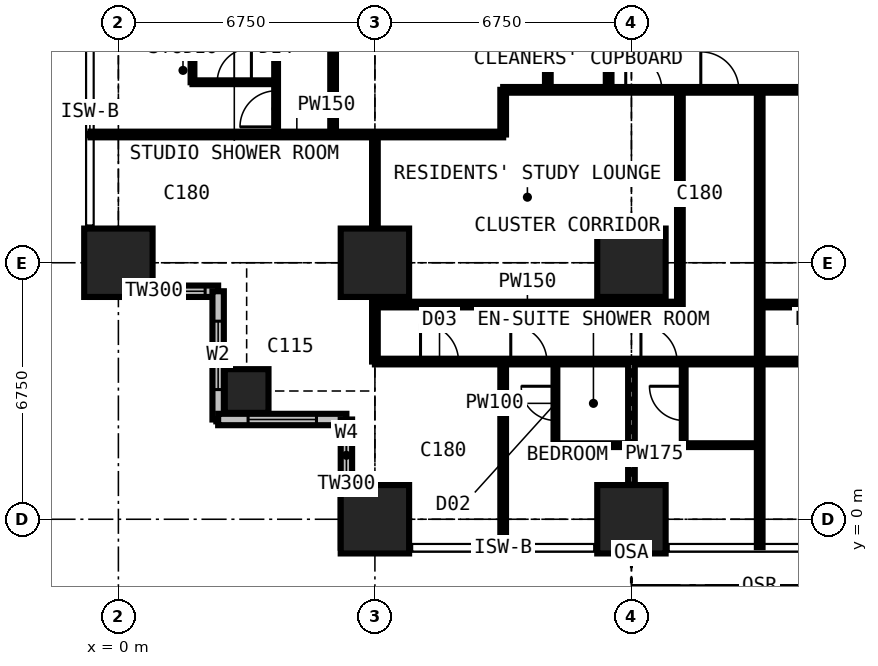
"""IFC4 building model, lengths in metres.
Left out: names, types, materials, properties, quantities, classifications, styles, units other than length and angle.
Written with IfcOpenShell. Run it as: python <this file> out.ifc"""

import sys

from ifc_helpers import new_model, si_unit, direction, frame, frame_2d, origin, origin_2d, place, context, subcontext, project, spatial, rectangle, extrude, element, fill, save


model = new_model("IFC4")
c1 = context("Model", 3, precision=1e-05, world=origin(), true_north=direction((0.0, 1.0)))
c2 = subcontext(c1, "Body", "Model", "MODEL_VIEW")
j1 = project(units=[si_unit("LENGTHUNIT", "METRE"), si_unit("PLANEANGLEUNIT", "RADIAN")], contexts=[c1])
p1 = place(None, origin())
s1 = spatial("IfcSite", under=j1, at=p1, CompositionType="ELEMENT")
p2 = place(p1, origin())
s2 = spatial("IfcBuilding", under=s1, at=p2, CompositionType="ELEMENT")
p3 = place(p2, frame((0.0, 0.0, 98.1)))
s3 = spatial("IfcBuildingStorey", under=s2, at=p3, CompositionType="ELEMENT", Elevation=98.1)
p4 = place(p3, frame((0.0, 6.75, 0.0), z_axis=(0.0, 0.0, 1.0), x_axis=(1.0, 0.0, 0.0)))
e1 = element("IfcColumn", 1, at=p4, inside=s3, PredefinedType="COLUMN", context=c2, shape_type="SweptSolid", body=[
    extrude(rectangle(XDim=1.8, YDim=1.8, at=origin_2d()), origin(), (0.0, 0.0, 1.0), 3.6),
])
p5 = place(p3, frame((3.375, 3.375, 0.0), z_axis=(0.0, 0.0, 1.0), x_axis=(1.0, 0.0, 0.0)))
e2 = element("IfcColumn", 2, at=p5, inside=s3, PredefinedType="COLUMN", context=c2, shape_type="SweptSolid", body=[
    extrude(rectangle(XDim=1.15, YDim=1.15, at=origin_2d()), origin(), (0.0, 0.0, 1.0), 3.6),
])
for number, where, z_axis, x_axis in (
    (3, (6.75, 0.0, 0.0), (0.0, 0.0, 1.0), (1.0, 0.0, 0.0)),
    (4, (6.75, 6.75, 0.0), (0.0, 0.0, 1.0), (1.0, 0.0, 0.0)),
    (5, (13.5, 0.0, 0.0), (0.0, 0.0, 1.0), (1.0, 0.0, 0.0)),
    (6, (13.5, 6.75, 0.0), (0.0, 0.0, 1.0), (1.0, 0.0, 0.0)),
):
    element("IfcColumn", number, at=place(p3, frame(where, z_axis=z_axis, x_axis=x_axis)), inside=s3, PredefinedType="COLUMN", context=c2, shape_type="SweptSolid", body=[
        extrude(rectangle(XDim=1.8, YDim=1.8, at=origin_2d()), origin(), (0.0, 0.0, 1.0), 3.6),
    ])
p6 = place(p3, frame((-0.75, 6.0, 0.0), z_axis=(0.0, 0.0, 1.0), x_axis=(1.0, 0.0, 0.0)))
e7 = element("IfcWall", 7, at=p6, inside=s3, PredefinedType="SOLIDWALL", context=c2, shape_type="SweptSolid", body=[
    extrude(rectangle(XDim=3.375, YDim=0.3, at=frame_2d((1.688, 0.0))), origin(), (0.0, 0.0, 1.0), 3.375),
])
p7 = place(p6, frame((1.833, 0.0, 0.9)))
e8 = element("IfcOpeningElement", 8, at=p7, cuts=e7, PredefinedType="OPENING", context=c2, shape_type="SweptSolid", body=[
    extrude(rectangle(XDim=1.2, YDim=1.8, at=frame_2d((0.6, 0.9))), frame((0.0, 0.16, 0.0), z_axis=(0.0, -1.0, 0.0), x_axis=(1.0, 0.0, 0.0)), (0.0, 0.0, 1.0), 0.32),
])
p8 = place(p3, frame((2.625, 6.0, 0.0), z_axis=(0.0, 0.0, 1.0), x_axis=(0.0, -1.0, 0.0)))
e9 = element("IfcWall", 9, at=p8, inside=s3, PredefinedType="SOLIDWALL", context=c2, shape_type="SweptSolid", body=[
    extrude(rectangle(XDim=3.375, YDim=0.3, at=frame_2d((1.688, 0.0))), origin(), (0.0, 0.0, 1.0), 3.375),
])
p9 = place(p8, frame((0.788, 0.0, 0.6)))
e10 = element("IfcOpeningElement", 10, at=p9, cuts=e9, PredefinedType="OPENING", context=c2, shape_type="SweptSolid", body=[
    extrude(rectangle(XDim=1.8, YDim=2.1, at=frame_2d((0.9, 1.05))), frame((0.0, 0.16, 0.0), z_axis=(0.0, -1.0, 0.0), x_axis=(1.0, 0.0, 0.0)), (0.0, 0.0, 1.0), 0.32),
])
p10 = place(p3, frame((2.625, 2.625, 0.0), z_axis=(0.0, 0.0, 1.0), x_axis=(1.0, 0.0, 0.0)))
e11 = element("IfcWall", 11, at=p10, inside=s3, PredefinedType="SOLIDWALL", context=c2, shape_type="SweptSolid", body=[
    extrude(rectangle(XDim=3.375, YDim=0.3, at=frame_2d((1.688, 0.0))), origin(), (0.0, 0.0, 1.0), 3.375),
])
p11 = place(p10, frame((0.788, 0.0, 0.6)))
e12 = element("IfcOpeningElement", 12, at=p11, cuts=e11, PredefinedType="OPENING", context=c2, shape_type="SweptSolid", body=[
    extrude(rectangle(XDim=1.8, YDim=2.1, at=frame_2d((0.9, 1.05))), frame((0.0, 0.16, 0.0), z_axis=(0.0, -1.0, 0.0), x_axis=(1.0, 0.0, 0.0)), (0.0, 0.0, 1.0), 0.32),
])
p12 = place(p3, frame((6.0, 2.625, 0.0), z_axis=(0.0, 0.0, 1.0), x_axis=(0.0, -1.0, 0.0)))
e13 = element("IfcWall", 13, at=p12, inside=s3, PredefinedType="SOLIDWALL", context=c2, shape_type="SweptSolid", body=[
    extrude(rectangle(XDim=3.375, YDim=0.3, at=frame_2d((1.688, 0.0))), origin(), (0.0, 0.0, 1.0), 3.375),
])
p13 = place(p12, frame((0.343, 0.0, 0.9)))
e14 = element("IfcOpeningElement", 14, at=p13, cuts=e13, PredefinedType="OPENING", context=c2, shape_type="SweptSolid", body=[
    extrude(rectangle(XDim=1.2, YDim=1.8, at=frame_2d((0.6, 0.9))), frame((0.0, 0.16, 0.0), z_axis=(0.0, -1.0, 0.0), x_axis=(1.0, 0.0, 0.0)), (0.0, 0.0, 1.0), 0.32),
])
p14 = place(p3, frame((-0.734, 10.125, 0.0), z_axis=(0.0, 0.0, 1.0), x_axis=(1.0, 0.0, 0.0)))
e15 = element("IfcWall", 15, at=p14, inside=s3, PredefinedType="PARTITIONING", context=c2, shape_type="SweptSolid", body=[
    extrude(rectangle(XDim=10.859, YDim=0.15, at=frame_2d((5.429, 0.0))), origin(), (0.0, 0.0, 1.0), 3.375),
])
p15 = place(p3, frame((1.95, 11.5, 0.0), z_axis=(0.0, 0.0, 1.0), x_axis=(0.0, 1.0, 0.0)))
e16 = element("IfcWall", 16, at=p15, inside=s3, PredefinedType="PARTITIONING", context=c2, shape_type="SweptSolid", body=[
    extrude(rectangle(XDim=2.0, YDim=0.1, at=frame_2d((1.0, 0.0))), origin(), (0.0, 0.0, 1.0), 3.375),
])
p16 = place(p3, frame((1.95, 11.5, 0.0), z_axis=(0.0, 0.0, 1.0), x_axis=(1.0, 0.0, 0.0)))
e17 = element("IfcWall", 17, at=p16, inside=s3, PredefinedType="PARTITIONING", context=c2, shape_type="SweptSolid", body=[
    extrude(rectangle(XDim=2.2, YDim=0.1, at=frame_2d((1.1, 0.0))), origin(), (0.0, 0.0, 1.0), 3.375),
])
p17 = place(p16, frame((0.65, 0.0, 0.0)))
e18 = element("IfcOpeningElement", 18, at=p17, cuts=e17, PredefinedType="OPENING", context=c2, shape_type="SweptSolid", body=[
    extrude(rectangle(XDim=0.9, YDim=2.2, at=frame_2d((0.45, 1.1))), frame((0.0, 0.06, 0.0), z_axis=(0.0, -1.0, 0.0), x_axis=(1.0, 0.0, 0.0)), (0.0, 0.0, 1.0), 0.12),
])
p18 = place(p3, frame((4.15, 10.125, 0.0), z_axis=(0.0, 0.0, 1.0), x_axis=(0.0, 1.0, 0.0)))
e19 = element("IfcWall", 19, at=p18, inside=s3, PredefinedType="PARTITIONING", context=c2, shape_type="SweptSolid", body=[
    extrude(rectangle(XDim=16.875, YDim=0.1, at=frame_2d((8.438, 0.0))), origin(), (0.0, 0.0, 1.0), 3.375),
])
p19 = place(p18, frame((0.2, 0.0, 0.0)))
e20 = element("IfcOpeningElement", 20, at=p19, cuts=e19, PredefinedType="OPENING", context=c2, shape_type="SweptSolid", body=[
    extrude(rectangle(XDim=0.95, YDim=2.2, at=frame_2d((0.475, 1.1))), frame((0.0, 0.06, 0.0), z_axis=(0.0, -1.0, 0.0), x_axis=(1.0, 0.0, 0.0)), (0.0, 0.0, 1.0), 0.12),
])
p20 = place(p18, frame((3.625, 0.0, 0.0)))
e21 = element("IfcOpeningElement", 21, at=p20, cuts=e19, PredefinedType="OPENING", context=c2, shape_type="SweptSolid", body=[
    extrude(rectangle(XDim=0.95, YDim=2.2, at=frame_2d((0.475, 1.1))), frame((0.0, 0.06, 0.0), z_axis=(0.0, -1.0, 0.0), x_axis=(1.0, 0.0, 0.0)), (0.0, 0.0, 1.0), 0.12),
])
p21 = place(p18, frame((7.0, 0.0, 0.0)))
e22 = element("IfcOpeningElement", 22, at=p21, cuts=e19, PredefinedType="OPENING", context=c2, shape_type="SweptSolid", body=[
    extrude(rectangle(XDim=0.95, YDim=2.2, at=frame_2d((0.475, 1.1))), frame((0.0, 0.06, 0.0), z_axis=(0.0, -1.0, 0.0), x_axis=(1.0, 0.0, 0.0)), (0.0, 0.0, 1.0), 0.12),
])
p22 = place(p18, frame((10.375, 0.0, 0.0)))
e23 = element("IfcOpeningElement", 23, at=p22, cuts=e19, PredefinedType="OPENING", context=c2, shape_type="SweptSolid", body=[
    extrude(rectangle(XDim=0.95, YDim=2.2, at=frame_2d((0.475, 1.1))), frame((0.0, 0.06, 0.0), z_axis=(0.0, -1.0, 0.0), x_axis=(1.0, 0.0, 0.0)), (0.0, 0.0, 1.0), 0.12),
])
p23 = place(p3, frame((5.65, 10.125, 0.0), z_axis=(0.0, 0.0, 1.0), x_axis=(0.0, 1.0, 0.0)))
e24 = element("IfcWall", 24, at=p23, inside=s3, PredefinedType="PARTITIONING", context=c2, shape_type="SweptSolid", body=[
    extrude(rectangle(XDim=10.762, YDim=0.15, at=frame_2d((5.381, 0.0))), origin(), (0.0, 0.0, 1.0), 3.375),
])
p24 = place(p23, frame((4.9, 0.0, 0.0)))
e25 = element("IfcOpeningElement", 25, at=p24, cuts=e24, PredefinedType="OPENING", context=c2, shape_type="SweptSolid", body=[
    extrude(rectangle(XDim=0.95, YDim=2.2, at=frame_2d((0.475, 1.1))), frame((0.0, 0.085, 0.0), z_axis=(0.0, -1.0, 0.0), x_axis=(1.0, 0.0, 0.0)), (0.0, 0.0, 1.0), 0.17),
])
p25 = place(p3, frame((6.75, 4.15, 0.0), z_axis=(0.0, 0.0, 1.0), x_axis=(0.0, 1.0, 0.0)))
e26 = element("IfcWall", 26, at=p25, inside=s3, PredefinedType="PARTITIONING", context=c2, shape_type="SweptSolid", body=[
    extrude(rectangle(XDim=5.975, YDim=0.15, at=frame_2d((2.988, 0.0))), origin(), (0.0, 0.0, 1.0), 2.877),
])
p26 = place(p3, frame((6.75, 4.15, 0.0), z_axis=(0.0, 0.0, 1.0), x_axis=(1.0, 0.0, 0.0)))
e27 = element("IfcWall", 27, at=p26, inside=s3, PredefinedType="PARTITIONING", context=c2, shape_type="SweptSolid", body=[
    extrude(rectangle(XDim=23.625, YDim=0.15, at=frame_2d((11.812, 0.0))), origin(), (0.0, 0.0, 1.0), 3.375),
])
p27 = place(p26, frame((1.2, 0.0, 0.0)))
e28 = element("IfcOpeningElement", 28, at=p27, cuts=e27, PredefinedType="OPENING", context=c2, shape_type="SweptSolid", body=[
    extrude(rectangle(XDim=1.0, YDim=2.2, at=frame_2d((0.5, 1.1))), frame((0.0, 0.085, 0.0), z_axis=(0.0, -1.0, 0.0), x_axis=(1.0, 0.0, 0.0)), (0.0, 0.0, 1.0), 0.17),
])
p28 = place(p26, frame((3.575, 0.0, 0.0)))
e29 = element("IfcOpeningElement", 29, at=p28, cuts=e27, PredefinedType="OPENING", context=c2, shape_type="SweptSolid", body=[
    extrude(rectangle(XDim=0.95, YDim=2.2, at=frame_2d((0.475, 1.1))), frame((0.0, 0.085, 0.0), z_axis=(0.0, -1.0, 0.0), x_axis=(1.0, 0.0, 0.0)), (0.0, 0.0, 1.0), 0.17),
])
p29 = place(p26, frame((7.0, 0.0, 0.0)))
e30 = element("IfcOpeningElement", 30, at=p29, cuts=e27, PredefinedType="OPENING", context=c2, shape_type="SweptSolid", body=[
    extrude(rectangle(XDim=0.95, YDim=2.2, at=frame_2d((0.475, 1.1))), frame((0.0, 0.085, 0.0), z_axis=(0.0, -1.0, 0.0), x_axis=(1.0, 0.0, 0.0)), (0.0, 0.0, 1.0), 0.17),
])
p30 = place(p26, frame((18.475, 0.0, 0.0)))
e31 = element("IfcOpeningElement", 31, at=p30, cuts=e27, PredefinedType="OPENING", context=c2, shape_type="SweptSolid", body=[
    extrude(rectangle(XDim=0.95, YDim=2.2, at=frame_2d((0.475, 1.1))), frame((0.0, 0.085, 0.0), z_axis=(0.0, -1.0, 0.0), x_axis=(1.0, 0.0, 0.0)), (0.0, 0.0, 1.0), 0.17),
])
p31 = place(p26, frame((11.725, 0.0, 0.0)))
e32 = element("IfcOpeningElement", 32, at=p31, cuts=e27, PredefinedType="OPENING", context=c2, shape_type="SweptSolid", body=[
    extrude(rectangle(XDim=0.95, YDim=2.2, at=frame_2d((0.475, 1.1))), frame((0.0, 0.085, 0.0), z_axis=(0.0, -1.0, 0.0), x_axis=(1.0, 0.0, 0.0)), (0.0, 0.0, 1.0), 0.17),
])
p32 = place(p3, frame((6.75, 5.65, 0.0), z_axis=(0.0, 0.0, 1.0), x_axis=(1.0, 0.0, 0.0)))
e33 = element("IfcWall", 33, at=p32, inside=s3, PredefinedType="PARTITIONING", context=c2, shape_type="SweptSolid", body=[
    extrude(rectangle(XDim=8.025, YDim=0.15, at=frame_2d((4.012, 0.0))), origin(), (0.0, 0.0, 1.0), 3.375),
])
p33 = place(p3, frame((10.125, -0.734, 0.0), z_axis=(0.0, 0.0, 1.0), x_axis=(0.0, 1.0, 0.0)))
e34 = element("IfcWall", 34, at=p33, inside=s3, PredefinedType="PARTITIONING", context=c2, shape_type="SweptSolid", body=[
    extrude(rectangle(XDim=4.884, YDim=0.15, at=frame_2d((2.442, 0.0))), origin(), (0.0, 0.0, 1.0), 3.375),
])
p34 = place(p3, frame((10.125, 10.125, 0.0), z_axis=(0.0, 0.0, 1.0), x_axis=(0.0, 1.0, 0.0)))
e35 = element("IfcWall", 35, at=p34, inside=s3, PredefinedType="PARTITIONING", context=c2, shape_type="SweptSolid", body=[
    extrude(rectangle(XDim=1.175, YDim=0.15, at=frame_2d((0.587, 0.0))), origin(), (0.0, 0.0, 1.0), 3.375),
])
p35 = place(p3, frame((10.125, 11.3, 0.0), z_axis=(0.0, 0.0, 1.0), x_axis=(1.0, 0.0, 0.0)))
e36 = element("IfcWall", 36, at=p35, inside=s3, PredefinedType="PARTITIONING", context=c2, shape_type="SweptSolid", body=[
    extrude(rectangle(XDim=20.675, YDim=0.15, at=frame_2d((10.337, 0.0))), origin(), (0.0, 0.0, 1.0), 3.375),
])
p36 = place(p35, frame((5.2, 0.0, 0.0)))
e37 = element("IfcOpeningElement", 37, at=p36, cuts=e36, PredefinedType="OPENING", context=c2, shape_type="SweptSolid", body=[
    extrude(rectangle(XDim=1.0, YDim=2.2, at=frame_2d((0.5, 1.1))), frame((0.0, 0.085, 0.0), z_axis=(0.0, -1.0, 0.0), x_axis=(1.0, 0.0, 0.0)), (0.0, 0.0, 1.0), 0.17),
])
p37 = place(p35, frame((11.312, 0.0, 0.0)))
e38 = element("IfcOpeningElement", 38, at=p37, cuts=e36, PredefinedType="OPENING", context=c2, shape_type="SweptSolid", body=[
    extrude(rectangle(XDim=1.0, YDim=2.2, at=frame_2d((0.5, 1.1))), frame((0.0, 0.085, 0.0), z_axis=(0.0, -1.0, 0.0), x_axis=(1.0, 0.0, 0.0)), (0.0, 0.0, 1.0), 0.17),
])
p38 = place(p35, frame((3.225, 0.0, 0.0)))
e39 = element("IfcOpeningElement", 39, at=p38, cuts=e36, PredefinedType="OPENING", context=c2, shape_type="SweptSolid", body=[
    extrude(rectangle(XDim=0.95, YDim=2.2, at=frame_2d((0.475, 1.1))), frame((0.0, 0.085, 0.0), z_axis=(0.0, -1.0, 0.0), x_axis=(1.0, 0.0, 0.0)), (0.0, 0.0, 1.0), 0.17),
])
p39 = place(p3, frame((11.3, 11.3, 0.0), z_axis=(0.0, 0.0, 1.0), x_axis=(0.0, 1.0, 0.0)))
e40 = element("IfcWall", 40, at=p39, inside=s3, PredefinedType="PARTITIONING", context=c2, shape_type="SweptSolid", body=[
    extrude(rectangle(XDim=19.3, YDim=0.15, at=frame_2d((9.65, 0.0))), origin(), (0.0, 0.0, 1.0), 3.375),
])
p40 = place(p39, frame((18.1, 0.0, 0.0)))
e41 = element("IfcOpeningElement", 41, at=p40, cuts=e40, PredefinedType="OPENING", context=c2, shape_type="SweptSolid", body=[
    extrude(rectangle(XDim=1.0, YDim=2.2, at=frame_2d((0.5, 1.1))), frame((0.0, 0.085, 0.0), z_axis=(0.0, -1.0, 0.0), x_axis=(1.0, 0.0, 0.0)), (0.0, 0.0, 1.0), 0.17),
])
p41 = place(p39, frame((10.137, 0.0, 0.0)))
e42 = element("IfcOpeningElement", 42, at=p41, cuts=e40, PredefinedType="OPENING", context=c2, shape_type="SweptSolid", body=[
    extrude(rectangle(XDim=1.0, YDim=2.2, at=frame_2d((0.5, 1.1))), frame((0.0, 0.085, 0.0), z_axis=(0.0, -1.0, 0.0), x_axis=(1.0, 0.0, 0.0)), (0.0, 0.0, 1.0), 0.17),
])
p42 = place(p3, frame((11.5, 1.95, 0.0), z_axis=(0.0, 0.0, 1.0), x_axis=(0.0, 1.0, 0.0)))
e43 = element("IfcWall", 43, at=p42, inside=s3, PredefinedType="PARTITIONING", context=c2, shape_type="SweptSolid", body=[
    extrude(rectangle(XDim=2.2, YDim=0.1, at=frame_2d((1.1, 0.0))), origin(), (0.0, 0.0, 1.0), 3.375),
])
p43 = place(p42, frame((0.65, 0.0, 0.0)))
e44 = element("IfcOpeningElement", 44, at=p43, cuts=e43, PredefinedType="OPENING", context=c2, shape_type="SweptSolid", body=[
    extrude(rectangle(XDim=0.9, YDim=2.2, at=frame_2d((0.45, 1.1))), frame((0.0, 0.06, 0.0), z_axis=(0.0, -1.0, 0.0), x_axis=(1.0, 0.0, 0.0)), (0.0, 0.0, 1.0), 0.12),
])
p44 = place(p3, frame((11.5, 1.95, 0.0), z_axis=(0.0, 0.0, 1.0), x_axis=(1.0, 0.0, 0.0)))
e45 = element("IfcWall", 45, at=p44, inside=s3, PredefinedType="PARTITIONING", context=c2, shape_type="SweptSolid", body=[
    extrude(rectangle(XDim=2.0, YDim=0.1, at=frame_2d((1.0, 0.0))), origin(), (0.0, 0.0, 1.0), 3.375),
])
p45 = place(p3, frame((12.9, 11.3, 0.0), z_axis=(0.0, 0.0, 1.0), x_axis=(0.0, 1.0, 0.0)))
e46 = element("IfcWall", 46, at=p45, inside=s3, PredefinedType="PARTITIONING", context=c2, shape_type="SweptSolid", body=[
    extrude(rectangle(XDim=1.6, YDim=0.15, at=frame_2d((0.8, 0.0))), origin(), (0.0, 0.0, 1.0), 3.375),
])
p46 = place(p3, frame((13.5, -0.734, 0.0), z_axis=(0.0, 0.0, 1.0), x_axis=(0.0, 1.0, 0.0)))
e47 = element("IfcWall", 47, at=p46, inside=s3, PredefinedType="PARTITIONING", context=c2, shape_type="SweptSolid", body=[
    extrude(rectangle(XDim=4.884, YDim=0.175, at=frame_2d((2.442, 0.0))), origin(), (0.0, 0.0, 1.0), 2.61),
])
p47 = place(p3, frame((14.775, 5.65, 0.0), z_axis=(0.0, 0.0, 1.0), x_axis=(0.0, 1.0, 0.0)))
e48 = element("IfcWall", 48, at=p47, inside=s3, PredefinedType="PARTITIONING", context=c2, shape_type="SweptSolid", body=[
    extrude(rectangle(XDim=5.65, YDim=0.15, at=frame_2d((2.825, 0.0))), origin(), (0.0, 0.0, 1.0), 3.375),
])
p48 = place(p3, frame((14.875, 1.95, 0.0), z_axis=(0.0, 0.0, 1.0), x_axis=(0.0, 1.0, 0.0)))
e49 = element("IfcWall", 49, at=p48, inside=s3, PredefinedType="PARTITIONING", context=c2, shape_type="SweptSolid", body=[
    extrude(rectangle(XDim=2.2, YDim=0.1, at=frame_2d((1.1, 0.0))), origin(), (0.0, 0.0, 1.0), 3.375),
])
p49 = place(p48, frame((0.65, 0.0, 0.0)))
e50 = element("IfcOpeningElement", 50, at=p49, cuts=e49, PredefinedType="OPENING", context=c2, shape_type="SweptSolid", body=[
    extrude(rectangle(XDim=0.9, YDim=2.2, at=frame_2d((0.45, 1.1))), frame((0.0, 0.06, 0.0), z_axis=(0.0, -1.0, 0.0), x_axis=(1.0, 0.0, 0.0)), (0.0, 0.0, 1.0), 0.12),
])
p50 = place(p3, frame((14.875, 1.95, 0.0), z_axis=(0.0, 0.0, 1.0), x_axis=(1.0, 0.0, 0.0)))
e51 = element("IfcWall", 51, at=p50, inside=s3, PredefinedType="PARTITIONING", context=c2, shape_type="SweptSolid", body=[
    extrude(rectangle(XDim=2.0, YDim=0.1, at=frame_2d((1.0, 0.0))), origin(), (0.0, 0.0, 1.0), 3.375),
])
p51 = place(p3, frame((16.875, -0.734, 0.0), z_axis=(0.0, 0.0, 1.0), x_axis=(0.0, 1.0, 0.0)))
e52 = element("IfcWall", 52, at=p51, inside=s3, PredefinedType="PARTITIONING", context=c2, shape_type="SweptSolid", body=[
    extrude(rectangle(XDim=12.034, YDim=0.15, at=frame_2d((6.017, 0.0))), origin(), (0.0, 0.0, 1.0), 3.375),
])
p52 = place(p3, frame((16.875, 5.65, 0.0), z_axis=(0.0, 0.0, 1.0), x_axis=(1.0, 0.0, 0.0)))
e53 = element("IfcWall", 53, at=p52, inside=s3, PredefinedType="PARTITIONING", context=c2, shape_type="SweptSolid", body=[
    extrude(rectangle(XDim=4.012, YDim=0.15, at=frame_2d((2.006, 0.0))), origin(), (0.0, 0.0, 1.0), 3.375),
])
p53 = place(p7, origin())
e54 = element("IfcWindow", 54, at=p53, inside=s3, PartitioningType="SINGLE_PANEL", PredefinedType="WINDOW", context=c2, shape_type="SweptSolid", body=[
    extrude(rectangle(XDim=1.2, YDim=1.8, at=frame_2d((0.6, 0.9))), frame((0.0, 0.03, 0.0), z_axis=(0.0, -1.0, 0.0), x_axis=(1.0, 0.0, 0.0)), (0.0, 0.0, 1.0), 0.06),
])
fill(e8, e54)
p54 = place(p9, origin())
e55 = element("IfcWindow", 55, at=p54, inside=s3, PartitioningType="SINGLE_PANEL", PredefinedType="WINDOW", context=c2, shape_type="SweptSolid", body=[
    extrude(rectangle(XDim=1.8, YDim=2.1, at=frame_2d((0.9, 1.05))), frame((0.0, 0.03, 0.0), z_axis=(0.0, -1.0, 0.0), x_axis=(1.0, 0.0, 0.0)), (0.0, 0.0, 1.0), 0.06),
])
fill(e10, e55)
p55 = place(p11, origin())
e56 = element("IfcWindow", 56, at=p55, inside=s3, PartitioningType="SINGLE_PANEL", PredefinedType="WINDOW", context=c2, shape_type="SweptSolid", body=[
    extrude(rectangle(XDim=1.8, YDim=2.1, at=frame_2d((0.9, 1.05))), frame((0.0, 0.03, 0.0), z_axis=(0.0, -1.0, 0.0), x_axis=(1.0, 0.0, 0.0)), (0.0, 0.0, 1.0), 0.06),
])
fill(e12, e56)
p56 = place(p13, origin())
e57 = element("IfcWindow", 57, at=p56, inside=s3, PartitioningType="SINGLE_PANEL", PredefinedType="WINDOW", context=c2, shape_type="SweptSolid", body=[
    extrude(rectangle(XDim=1.2, YDim=1.8, at=frame_2d((0.6, 0.9))), frame((0.0, 0.03, 0.0), z_axis=(0.0, -1.0, 0.0), x_axis=(1.0, 0.0, 0.0)), (0.0, 0.0, 1.0), 0.06),
])
fill(e14, e57)
p57 = place(p27, origin())
e58 = element("IfcDoor", 58, at=p57, inside=s3, OperationType="SINGLE_SWING_LEFT", PredefinedType="DOOR", context=c2, shape_type="SweptSolid", body=[
    extrude(rectangle(XDim=1.0, YDim=2.2, at=frame_2d((0.5, 1.1))), frame((0.0, 0.025, 0.0), z_axis=(0.0, -1.0, 0.0), x_axis=(1.0, 0.0, 0.0)), (0.0, 0.0, 1.0), 0.05),
])
fill(e28, e58)
p58 = place(p28, origin())
e59 = element("IfcDoor", 59, at=p58, inside=s3, OperationType="SINGLE_SWING_LEFT", PredefinedType="DOOR", context=c2, shape_type="SweptSolid", body=[
    extrude(rectangle(XDim=0.95, YDim=2.2, at=frame_2d((0.475, 1.1))), frame((0.0, 0.025, 0.0), z_axis=(0.0, -1.0, 0.0), x_axis=(1.0, 0.0, 0.0)), (0.0, 0.0, 1.0), 0.05),
])
fill(e29, e59)
p59 = place(p43, origin())
e60 = element("IfcDoor", 60, at=p59, inside=s3, OperationType="SINGLE_SWING_RIGHT", PredefinedType="DOOR", context=c2, shape_type="SweptSolid", body=[
    extrude(rectangle(XDim=0.9, YDim=2.2, at=frame_2d((0.45, 1.1))), frame((0.0, 0.025, 0.0), z_axis=(0.0, -1.0, 0.0), x_axis=(1.0, 0.0, 0.0)), (0.0, 0.0, 1.0), 0.05),
])
fill(e44, e60)
p60 = place(p29, origin())
e61 = element("IfcDoor", 61, at=p60, inside=s3, OperationType="SINGLE_SWING_LEFT", PredefinedType="DOOR", context=c2, shape_type="SweptSolid", body=[
    extrude(rectangle(XDim=0.95, YDim=2.2, at=frame_2d((0.475, 1.1))), frame((0.0, 0.025, 0.0), z_axis=(0.0, -1.0, 0.0), x_axis=(1.0, 0.0, 0.0)), (0.0, 0.0, 1.0), 0.05),
])
fill(e30, e61)
p61 = place(p49, origin())
e62 = element("IfcDoor", 62, at=p61, inside=s3, OperationType="SINGLE_SWING_RIGHT", PredefinedType="DOOR", context=c2, shape_type="SweptSolid", body=[
    extrude(rectangle(XDim=0.9, YDim=2.2, at=frame_2d((0.45, 1.1))), frame((0.0, 0.025, 0.0), z_axis=(0.0, -1.0, 0.0), x_axis=(1.0, 0.0, 0.0)), (0.0, 0.0, 1.0), 0.05),
])
fill(e50, e62)
p62 = place(p36, origin())
e63 = element("IfcDoor", 63, at=p62, inside=s3, OperationType="SINGLE_SWING_LEFT", PredefinedType="DOOR", context=c2, shape_type="SweptSolid", body=[
    extrude(rectangle(XDim=1.0, YDim=2.2, at=frame_2d((0.5, 1.1))), frame((0.0, 0.025, 0.0), z_axis=(0.0, -1.0, 0.0), x_axis=(1.0, 0.0, 0.0)), (0.0, 0.0, 1.0), 0.05),
])
fill(e37, e63)
p63 = place(p38, origin())
e64 = element("IfcDoor", 64, at=p63, inside=s3, OperationType="SINGLE_SWING_LEFT", PredefinedType="DOOR", context=c2, shape_type="SweptSolid", body=[
    extrude(rectangle(XDim=0.95, YDim=2.2, at=frame_2d((0.475, 1.1))), frame((0.0, 0.025, 0.0), z_axis=(0.0, -1.0, 0.0), x_axis=(1.0, 0.0, 0.0)), (0.0, 0.0, 1.0), 0.05),
])
fill(e39, e64)
p64 = place(p19, origin())
e65 = element("IfcDoor", 65, at=p64, inside=s3, OperationType="SINGLE_SWING_LEFT", PredefinedType="DOOR", context=c2, shape_type="SweptSolid", body=[
    extrude(rectangle(XDim=0.95, YDim=2.2, at=frame_2d((0.475, 1.1))), frame((0.0, 0.025, 0.0), z_axis=(0.0, -1.0, 0.0), x_axis=(1.0, 0.0, 0.0)), (0.0, 0.0, 1.0), 0.05),
])
fill(e20, e65)
p65 = place(p17, origin())
e66 = element("IfcDoor", 66, at=p65, inside=s3, OperationType="SINGLE_SWING_RIGHT", PredefinedType="DOOR", context=c2, shape_type="SweptSolid", body=[
    extrude(rectangle(XDim=0.9, YDim=2.2, at=frame_2d((0.45, 1.1))), frame((0.0, 0.025, 0.0), z_axis=(0.0, -1.0, 0.0), x_axis=(1.0, 0.0, 0.0)), (0.0, 0.0, 1.0), 0.05),
])
fill(e18, e66)
save(model, sys.argv[1])
